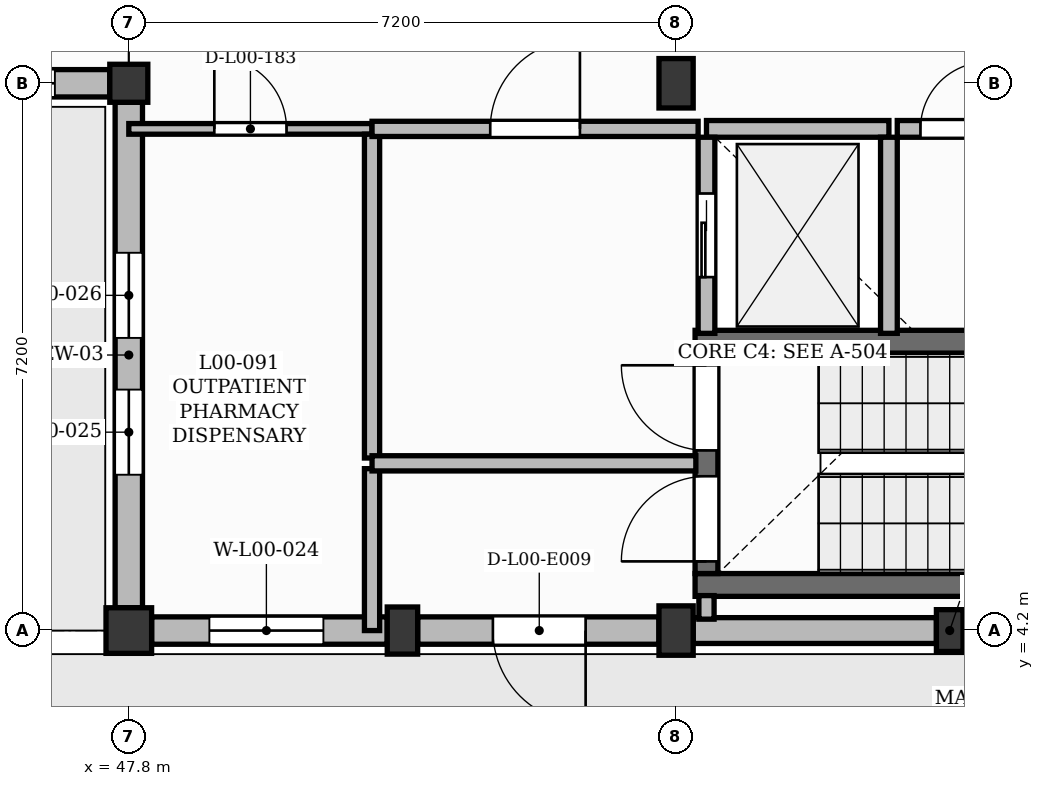
"""IFC4 building model, lengths in metres.
Left out: names, types, materials, properties, quantities, classifications, styles, units other than length and angle.
Written with IfcOpenShell. Run it as: python <this file> out.ifc"""

import sys

from ifc_helpers import new_model, si_unit, direction, frame, frame_2d, origin, origin_2d, place, context, subcontext, project, spatial, rectangle, extrude, element, fill, save


model = new_model("IFC4")
c1 = context("Model", 3, precision=1e-05, world=origin(), true_north=direction((0.0, 1.0)))
c2 = subcontext(c1, "Body", "Model", "MODEL_VIEW")
j1 = project(units=[si_unit("LENGTHUNIT", "METRE"), si_unit("PLANEANGLEUNIT", "RADIAN")], contexts=[c1])
p1 = place(None, origin())
s1 = spatial("IfcSite", under=j1, at=p1, CompositionType="ELEMENT")
p2 = place(p1, origin())
s2 = spatial("IfcBuilding", under=s1, at=p2, CompositionType="ELEMENT")
p3 = place(p2, origin())
s3 = spatial("IfcBuildingStorey", under=s2, at=p3, CompositionType="ELEMENT", Elevation=0.0)
p4 = place(p3, frame((47.8, 4.2, 0.0), z_axis=(0.0, 0.0, 1.0), x_axis=(1.0, 0.0, 0.0)))
e1 = element("IfcColumn", 1, at=p4, inside=s3, PredefinedType="COLUMN", context=c2, shape_type="SweptSolid", body=[
    extrude(rectangle(XDim=0.6, YDim=0.6, at=origin_2d()), origin(), (0.0, 0.0, 1.0), 4.2),
])
p5 = place(p3, frame((47.8, 11.4, 0.0), z_axis=(0.0, 0.0, 1.0), x_axis=(1.0, 0.0, 0.0)))
e2 = element("IfcColumn", 2, at=p5, inside=s3, PredefinedType="COLUMN", context=c2, shape_type="SweptSolid", body=[
    extrude(rectangle(XDim=0.5, YDim=0.5, at=origin_2d()), origin(), (0.0, 0.0, 1.0), 4.2),
])
for number, where, z_axis, x_axis in (
    (3, (55.0, 4.2, 0.0), (0.0, 0.0, 1.0), (1.0, 0.0, 0.0)),
    (4, (55.0, 11.4, 0.0), (0.0, 0.0, 1.0), (1.0, 0.0, 0.0)),
):
    element("IfcColumn", number, at=place(p3, frame(where, z_axis=z_axis, x_axis=x_axis)), inside=s3, PredefinedType="COLUMN", context=c2, shape_type="SweptSolid", body=[
        extrude(rectangle(XDim=0.45, YDim=0.65, at=origin_2d()), origin(), (0.0, 0.0, 1.0), 4.2),
    ])
p6 = place(p3, frame((51.4, 4.2, 0.0), z_axis=(0.0, 0.0, 1.0), x_axis=(1.0, 0.0, 0.0)))
e5 = element("IfcColumn", 5, at=p6, inside=s3, PredefinedType="PILASTER", context=c2, shape_type="SweptSolid", body=[
    extrude(rectangle(XDim=0.4, YDim=0.62, at=origin_2d()), origin(), (0.0, 0.0, 1.0), 4.2),
])
p7 = place(p3, frame((58.6, 4.2, 0.0), z_axis=(0.0, 0.0, 1.0), x_axis=(1.0, 0.0, 0.0)))
e6 = element("IfcColumn", 6, at=p7, inside=s3, PredefinedType="PILASTER", context=c2, shape_type="SweptSolid", body=[
    extrude(rectangle(XDim=0.35, YDim=0.55, at=origin_2d()), origin(), (0.0, 0.0, 1.0), 4.2),
])
p8 = place(p3, frame((40.9, 11.4, 0.0), z_axis=(0.0, 0.0, 1.0), x_axis=(1.0, 0.0, 0.0)))
e7 = element("IfcWall", 7, at=p8, inside=s3, PredefinedType="SOLIDWALL", context=c2, shape_type="SweptSolid", body=[
    extrude(rectangle(XDim=6.65, YDim=0.36, at=frame_2d((3.325, 0.0))), origin(), (0.0, 0.0, 1.0), 3.68),
])
p9 = place(p8, frame((2.735, 0.0, 0.0)))
e8 = element("IfcOpeningElement", 8, at=p9, cuts=e7, PredefinedType="OPENING", context=c2, shape_type="SweptSolid", body=[
    extrude(rectangle(XDim=1.18, YDim=2.2, at=frame_2d((0.59, 1.1))), frame((0.0, 0.19, 0.0), z_axis=(0.0, -1.0, 0.0), x_axis=(1.0, 0.0, 0.0)), (0.0, 0.0, 1.0), 0.38),
])
p10 = place(p8, frame((0.788, 0.0, 1.0)))
e9 = element("IfcOpeningElement", 9, at=p10, cuts=e7, PredefinedType="OPENING", context=c2, shape_type="SweptSolid", body=[
    extrude(rectangle(XDim=1.22, YDim=2.2, at=frame_2d((0.61, 1.1))), frame((0.0, 0.19, 0.0), z_axis=(0.0, -1.0, 0.0), x_axis=(1.0, 0.0, 0.0)), (0.0, 0.0, 1.0), 0.38),
])
p11 = place(p8, frame((4.577, 0.0, 1.0)))
e10 = element("IfcOpeningElement", 10, at=p11, cuts=e7, PredefinedType="OPENING", context=c2, shape_type="SweptSolid", body=[
    extrude(rectangle(XDim=1.35, YDim=2.2, at=frame_2d((0.675, 1.1))), frame((0.0, 0.19, 0.0), z_axis=(0.0, -1.0, 0.0), x_axis=(1.0, 0.0, 0.0)), (0.0, 0.0, 1.0), 0.38),
])
p12 = place(p3, frame((48.1, 4.2, 0.0), z_axis=(0.0, 0.0, 1.0), x_axis=(1.0, 0.0, 0.0)))
e11 = element("IfcWall", 11, at=p12, inside=s3, PredefinedType="SOLIDWALL", context=c2, shape_type="SweptSolid", body=[
    extrude(rectangle(XDim=3.1, YDim=0.36, at=frame_2d((1.55, 0.0))), origin(), (0.0, 0.0, 1.0), 3.68),
])
p13 = place(p12, frame((0.76, 0.0, 1.5)))
e12 = element("IfcOpeningElement", 12, at=p13, cuts=e11, PredefinedType="OPENING", context=c2, shape_type="SweptSolid", body=[
    extrude(rectangle(XDim=1.5, YDim=1.25, at=frame_2d((0.75, 0.625))), frame((0.0, 0.19, 0.0), z_axis=(0.0, -1.0, 0.0), x_axis=(1.0, 0.0, 0.0)), (0.0, 0.0, 1.0), 0.38),
])
p14 = place(p3, frame((51.6, 4.2, 0.0), z_axis=(0.0, 0.0, 1.0), x_axis=(1.0, 0.0, 0.0)))
e13 = element("IfcWall", 13, at=p14, inside=s3, PredefinedType="SOLIDWALL", context=c2, shape_type="SweptSolid", body=[
    extrude(rectangle(XDim=3.175, YDim=0.36, at=frame_2d((1.587, 0.0))), origin(), (0.0, 0.0, 1.0), 3.68),
])
p15 = place(p14, frame((0.99, 0.0, 0.0)))
e14 = element("IfcOpeningElement", 14, at=p15, cuts=e13, PredefinedType="OPENING", context=c2, shape_type="SweptSolid", body=[
    extrude(rectangle(XDim=1.22, YDim=2.2, at=frame_2d((0.61, 1.1))), frame((0.0, 0.19, 0.0), z_axis=(0.0, -1.0, 0.0), x_axis=(1.0, 0.0, 0.0)), (0.0, 0.0, 1.0), 0.38),
])
p16 = place(p3, frame((47.8, 4.5, 0.0), z_axis=(0.0, 0.0, 1.0), x_axis=(0.0, 1.0, 0.0)))
e15 = element("IfcWall", 15, at=p16, inside=s3, PredefinedType="SOLIDWALL", context=c2, shape_type="SweptSolid", body=[
    extrude(rectangle(XDim=6.65, YDim=0.36, at=frame_2d((3.325, 0.0))), origin(), (0.0, 0.0, 1.0), 3.68),
])
p17 = place(p16, frame((1.75, 0.0, 1.05)))
e16 = element("IfcOpeningElement", 16, at=p17, cuts=e15, PredefinedType="OPENING", context=c2, shape_type="SweptSolid", body=[
    extrude(rectangle(XDim=1.12, YDim=1.65, at=frame_2d((0.56, 0.825))), frame((0.0, 0.19, 0.0), z_axis=(0.0, -1.0, 0.0), x_axis=(1.0, 0.0, 0.0)), (0.0, 0.0, 1.0), 0.38),
])
p18 = place(p16, frame((3.55, 0.0, 1.05)))
e17 = element("IfcOpeningElement", 17, at=p18, cuts=e15, PredefinedType="OPENING", context=c2, shape_type="SweptSolid", body=[
    extrude(rectangle(XDim=1.12, YDim=1.65, at=frame_2d((0.56, 0.825))), frame((0.0, 0.19, 0.0), z_axis=(0.0, -1.0, 0.0), x_axis=(1.0, 0.0, 0.0)), (0.0, 0.0, 1.0), 0.38),
])
p19 = place(p3, frame((55.225, 4.2, 0.0), z_axis=(0.0, 0.0, 1.0), x_axis=(1.0, 0.0, 0.0)))
e18 = element("IfcWall", 18, at=p19, inside=s3, PredefinedType="SOLIDWALL", context=c2, shape_type="SweptSolid", body=[
    extrude(rectangle(XDim=3.2, YDim=0.34, at=frame_2d((1.6, 0.0))), origin(), (0.0, 0.0, 1.0), 3.68),
])
p20 = place(p3, frame((58.775, 4.2, 0.0), z_axis=(0.0, 0.0, 1.0), x_axis=(1.0, 0.0, 0.0)))
e19 = element("IfcWall", 19, at=p20, inside=s3, PredefinedType="SOLIDWALL", context=c2, shape_type="SweptSolid", body=[
    extrude(rectangle(XDim=3.175, YDim=0.34, at=frame_2d((1.587, 0.0))), origin(), (0.0, 0.0, 1.0), 3.68),
])
for number, where, z_axis, x_axis in (
    (20, (55.25, 4.8, 0.0), (0.0, 0.0, 1.0), (1.0, 0.0, 0.0)),
    (21, (55.25, 8.0, 0.0), (0.0, 0.0, 1.0), (1.0, 0.0, 0.0)),
):
    element("IfcWall", number, at=place(p3, frame(where, z_axis=z_axis, x_axis=x_axis)), inside=s3, PredefinedType="SHEAR", context=c2, shape_type="SweptSolid", body=[
        extrude(rectangle(XDim=6.7, YDim=0.3, at=frame_2d((3.35, 0.0))), origin(), (0.0, 0.0, 1.0), 4.25),
    ])
p21 = place(p3, frame((55.4, 4.95, 0.0), z_axis=(0.0, 0.0, 1.0), x_axis=(0.0, 1.0, 0.0)))
e22 = element("IfcWall", 22, at=p21, inside=s3, PredefinedType="SHEAR", context=c2, shape_type="SweptSolid", body=[
    extrude(rectangle(XDim=2.9, YDim=0.3, at=frame_2d((1.45, 0.0))), origin(), (0.0, 0.0, 1.0), 4.25),
])
p22 = place(p21, frame((0.16, 0.0, 0.0)))
e23 = element("IfcOpeningElement", 23, at=p22, cuts=e22, PredefinedType="OPENING", context=c2, shape_type="SweptSolid", body=[
    extrude(rectangle(XDim=1.12, YDim=2.1, at=frame_2d((0.56, 1.05))), frame((0.0, 0.16, 0.0), z_axis=(0.0, -1.0, 0.0), x_axis=(1.0, 0.0, 0.0)), (0.0, 0.0, 1.0), 0.32),
])
p23 = place(p21, frame((1.62, 0.0, 0.0)))
e24 = element("IfcOpeningElement", 24, at=p23, cuts=e22, PredefinedType="OPENING", context=c2, shape_type="SweptSolid", body=[
    extrude(rectangle(XDim=1.12, YDim=2.1, at=frame_2d((0.56, 1.05))), frame((0.0, 0.16, 0.0), z_axis=(0.0, -1.0, 0.0), x_axis=(1.0, 0.0, 0.0)), (0.0, 0.0, 1.0), 0.32),
])
p24 = place(p3, frame((55.4, 10.8, 0.0), z_axis=(0.0, 0.0, 1.0), x_axis=(1.0, 0.0, 0.0)))
e25 = element("IfcWall", 25, at=p24, inside=s3, PredefinedType="SOLIDWALL", context=c2, shape_type="SweptSolid", body=[
    extrude(rectangle(XDim=2.4, YDim=0.22, at=frame_2d((1.2, 0.0))), origin(), (0.0, 0.0, 1.0), 4.25),
])
p25 = place(p3, frame((55.4, 8.11, 0.0), z_axis=(0.0, 0.0, 1.0), x_axis=(0.0, 1.0, 0.0)))
e26 = element("IfcWall", 26, at=p25, inside=s3, PredefinedType="SOLIDWALL", context=c2, shape_type="SweptSolid", body=[
    extrude(rectangle(XDim=2.58, YDim=0.22, at=frame_2d((1.29, 0.0))), origin(), (0.0, 0.0, 1.0), 4.25),
])
p26 = place(p25, frame((0.74, 0.0, 0.0)))
e27 = element("IfcOpeningElement", 27, at=p26, cuts=e26, PredefinedType="OPENING", context=c2, shape_type="SweptSolid", body=[
    extrude(rectangle(XDim=1.1, YDim=2.15, at=frame_2d((0.55, 1.075))), frame((0.0, 0.12, 0.0), z_axis=(0.0, -1.0, 0.0), x_axis=(1.0, 0.0, 0.0)), (0.0, 0.0, 1.0), 0.24),
])
p27 = place(p3, frame((57.8, 8.11, 0.0), z_axis=(0.0, 0.0, 1.0), x_axis=(0.0, 1.0, 0.0)))
e28 = element("IfcWall", 28, at=p27, inside=s3, PredefinedType="SOLIDWALL", context=c2, shape_type="SweptSolid", body=[
    extrude(rectangle(XDim=2.58, YDim=0.22, at=frame_2d((1.29, 0.0))), origin(), (0.0, 0.0, 1.0), 4.25),
])
p28 = place(p3, frame((47.8, 10.8, 0.0), z_axis=(0.0, 0.0, 1.0), x_axis=(1.0, 0.0, 0.0)))
e29 = element("IfcWall", 29, at=p28, inside=s3, PredefinedType="PARTITIONING", context=c2, shape_type="SweptSolid", body=[
    extrude(rectangle(XDim=3.2, YDim=0.14, at=frame_2d((1.6, 0.0))), origin(), (0.0, 0.0, 1.0), 4.18),
])
p29 = place(p28, frame((1.125, 0.0, 0.0)))
e30 = element("IfcOpeningElement", 30, at=p29, cuts=e29, PredefinedType="OPENING", context=c2, shape_type="SweptSolid", body=[
    extrude(rectangle(XDim=0.95, YDim=2.1, at=frame_2d((0.475, 1.05))), frame((0.0, 0.08, 0.0), z_axis=(0.0, -1.0, 0.0), x_axis=(1.0, 0.0, 0.0)), (0.0, 0.0, 1.0), 0.16),
])
p30 = place(p3, frame((51.0, 4.2, 0.0), z_axis=(0.0, 0.0, 1.0), x_axis=(0.0, 1.0, 0.0)))
e31 = element("IfcWall", 31, at=p30, inside=s3, PredefinedType="PARTITIONING", context=c2, shape_type="SweptSolid", body=[
    extrude(rectangle(XDim=2.13, YDim=0.2, at=frame_2d((1.065, 0.0))), origin(), (0.0, 0.0, 1.0), 4.18),
])
for number, where, z_axis, x_axis in (
    (32, (51.0, 6.47, 0.0), (0.0, 0.0, 1.0), (0.0, 1.0, 0.0)),
    (33, (51.0, 6.4, 0.0), (0.0, 0.0, 1.0), (1.0, 0.0, 0.0)),
):
    element("IfcWall", number, at=place(p3, frame(where, z_axis=z_axis, x_axis=x_axis)), inside=s3, PredefinedType="PARTITIONING", context=c2, shape_type="SweptSolid", body=[
        extrude(rectangle(XDim=4.26, YDim=0.2, at=frame_2d((2.13, 0.0))), origin(), (0.0, 0.0, 1.0), 4.18),
    ])
p31 = place(p3, frame((51.0, 10.8, 0.0), z_axis=(0.0, 0.0, 1.0), x_axis=(1.0, 0.0, 0.0)))
e34 = element("IfcWall", 34, at=p31, inside=s3, PredefinedType="PARTITIONING", context=c2, shape_type="SweptSolid", body=[
    extrude(rectangle(XDim=4.29, YDim=0.2, at=frame_2d((2.145, 0.0))), origin(), (0.0, 0.0, 1.0), 4.18),
])
p32 = place(p31, frame((1.555, 0.0, 0.0)))
e35 = element("IfcOpeningElement", 35, at=p32, cuts=e34, PredefinedType="OPENING", context=c2, shape_type="SweptSolid", body=[
    extrude(rectangle(XDim=1.18, YDim=2.15, at=frame_2d((0.59, 1.075))), frame((0.0, 0.11, 0.0), z_axis=(0.0, -1.0, 0.0), x_axis=(1.0, 0.0, 0.0)), (0.0, 0.0, 1.0), 0.22),
])
p33 = place(p3, frame((57.91, 10.8, 0.0), z_axis=(0.0, 0.0, 1.0), x_axis=(1.0, 0.0, 0.0)))
e36 = element("IfcWall", 36, at=p33, inside=s3, PredefinedType="SOLIDWALL", context=c2, shape_type="SweptSolid", body=[
    extrude(rectangle(XDim=1.49, YDim=0.22, at=frame_2d((0.745, 0.0))), origin(), (0.0, 0.0, 1.0), 4.18),
])
p34 = place(p33, frame((0.305, 0.0, 0.0)))
e37 = element("IfcOpeningElement", 37, at=p34, cuts=e36, PredefinedType="OPENING", context=c2, shape_type="SweptSolid", body=[
    extrude(rectangle(XDim=0.88, YDim=2.05, at=frame_2d((0.44, 1.025))), frame((0.0, 0.12, 0.0), z_axis=(0.0, -1.0, 0.0), x_axis=(1.0, 0.0, 0.0)), (0.0, 0.0, 1.0), 0.24),
])
p35 = place(p3, frame((55.4, 4.35, 0.0), z_axis=(0.0, 0.0, 1.0), x_axis=(0.0, 1.0, 0.0)))
e38 = element("IfcWall", 38, at=p35, inside=s3, PredefinedType="PARTITIONING", context=c2, shape_type="SweptSolid", body=[
    extrude(rectangle(XDim=0.31, YDim=0.2, at=frame_2d((0.155, 0.0))), origin(), (0.0, 0.0, 1.0), 4.18),
])
p36 = place(p11, origin())
e39 = element("IfcWindow", 39, at=p36, inside=s3, PartitioningType="SINGLE_PANEL", PredefinedType="WINDOW", context=c2, shape_type="SweptSolid", body=[
    extrude(rectangle(XDim=1.35, YDim=2.2, at=frame_2d((0.675, 1.1))), frame((0.0, 0.03, 0.0), z_axis=(0.0, -1.0, 0.0), x_axis=(1.0, 0.0, 0.0)), (0.0, 0.0, 1.0), 0.06),
])
fill(e10, e39)
p37 = place(p13, origin())
e40 = element("IfcWindow", 40, at=p37, inside=s3, PartitioningType="DOUBLE_PANEL_VERTICAL", PredefinedType="WINDOW", context=c2, shape_type="SweptSolid", body=[
    extrude(rectangle(XDim=1.5, YDim=1.25, at=frame_2d((0.75, 0.625))), frame((0.0, 0.03, 0.0), z_axis=(0.0, -1.0, 0.0), x_axis=(1.0, 0.0, 0.0)), (0.0, 0.0, 1.0), 0.06),
])
fill(e12, e40)
p38 = place(p15, frame((1.22, 0.0, 0.0), z_axis=(0.0, 0.0, 1.0), x_axis=(-1.0, 0.0, 0.0)))
e41 = element("IfcDoor", 41, at=p38, inside=s3, OperationType="SINGLE_SWING_LEFT", PredefinedType="DOOR", context=c2, shape_type="SweptSolid", body=[
    extrude(rectangle(XDim=1.22, YDim=2.2, at=frame_2d((0.61, 1.1))), frame((0.0, 0.025, 0.0), z_axis=(0.0, -1.0, 0.0), x_axis=(1.0, 0.0, 0.0)), (0.0, 0.0, 1.0), 0.05),
])
fill(e14, e41)
p39 = place(p17, origin())
e42 = element("IfcWindow", 42, at=p39, inside=s3, PartitioningType="SINGLE_PANEL", PredefinedType="WINDOW", context=c2, shape_type="SweptSolid", body=[
    extrude(rectangle(XDim=1.12, YDim=1.65, at=frame_2d((0.56, 0.825))), frame((0.0, 0.03, 0.0), z_axis=(0.0, -1.0, 0.0), x_axis=(1.0, 0.0, 0.0)), (0.0, 0.0, 1.0), 0.06),
])
fill(e16, e42)
p40 = place(p18, origin())
e43 = element("IfcWindow", 43, at=p40, inside=s3, PartitioningType="SINGLE_PANEL", PredefinedType="WINDOW", context=c2, shape_type="SweptSolid", body=[
    extrude(rectangle(XDim=1.12, YDim=1.65, at=frame_2d((0.56, 0.825))), frame((0.0, 0.03, 0.0), z_axis=(0.0, -1.0, 0.0), x_axis=(1.0, 0.0, 0.0)), (0.0, 0.0, 1.0), 0.06),
])
fill(e17, e43)
p41 = place(p26, origin())
e44 = element("IfcDoor", 44, at=p41, inside=s3, OperationType="SLIDING_TO_LEFT", PredefinedType="DOOR", context=c2, shape_type="SweptSolid", body=[
    extrude(rectangle(XDim=1.1, YDim=2.15, at=frame_2d((0.55, 1.075))), frame((0.0, 0.025, 0.0), z_axis=(0.0, -1.0, 0.0), x_axis=(1.0, 0.0, 0.0)), (0.0, 0.0, 1.0), 0.05),
])
fill(e27, e44)
p42 = place(p22, origin())
e45 = element("IfcDoor", 45, at=p42, inside=s3, OperationType="SINGLE_SWING_LEFT", PredefinedType="DOOR", context=c2, shape_type="SweptSolid", body=[
    extrude(rectangle(XDim=1.12, YDim=2.1, at=frame_2d((0.56, 1.05))), frame((0.0, 0.025, 0.0), z_axis=(0.0, -1.0, 0.0), x_axis=(1.0, 0.0, 0.0)), (0.0, 0.0, 1.0), 0.05),
])
fill(e23, e45)
p43 = place(p23, origin())
e46 = element("IfcDoor", 46, at=p43, inside=s3, OperationType="SINGLE_SWING_RIGHT", PredefinedType="DOOR", context=c2, shape_type="SweptSolid", body=[
    extrude(rectangle(XDim=1.12, YDim=2.1, at=frame_2d((0.56, 1.05))), frame((0.0, 0.025, 0.0), z_axis=(0.0, -1.0, 0.0), x_axis=(1.0, 0.0, 0.0)), (0.0, 0.0, 1.0), 0.05),
])
fill(e24, e46)
p44 = place(p32, origin())
e47 = element("IfcDoor", 47, at=p44, inside=s3, OperationType="SINGLE_SWING_RIGHT", PredefinedType="DOOR", context=c2, shape_type="SweptSolid", body=[
    extrude(rectangle(XDim=1.18, YDim=2.15, at=frame_2d((0.59, 1.075))), frame((0.0, 0.025, 0.0), z_axis=(0.0, -1.0, 0.0), x_axis=(1.0, 0.0, 0.0)), (0.0, 0.0, 1.0), 0.05),
])
fill(e35, e47)
p45 = place(p34, origin())
e48 = element("IfcDoor", 48, at=p45, inside=s3, OperationType="SINGLE_SWING_RIGHT", PredefinedType="DOOR", context=c2, shape_type="SweptSolid", body=[
    extrude(rectangle(XDim=0.88, YDim=2.05, at=frame_2d((0.44, 1.025))), frame((0.0, 0.025, 0.0), z_axis=(0.0, -1.0, 0.0), x_axis=(1.0, 0.0, 0.0)), (0.0, 0.0, 1.0), 0.05),
])
fill(e37, e48)
p46 = place(p29, origin())
e49 = element("IfcDoor", 49, at=p46, inside=s3, OperationType="SINGLE_SWING_LEFT", PredefinedType="DOOR", context=c2, shape_type="SweptSolid", body=[
    extrude(rectangle(XDim=0.95, YDim=2.1, at=frame_2d((0.475, 1.05))), frame((0.0, 0.025, 0.0), z_axis=(0.0, -1.0, 0.0), x_axis=(1.0, 0.0, 0.0)), (0.0, 0.0, 1.0), 0.05),
])
fill(e30, e49)
save(model, sys.argv[1])
